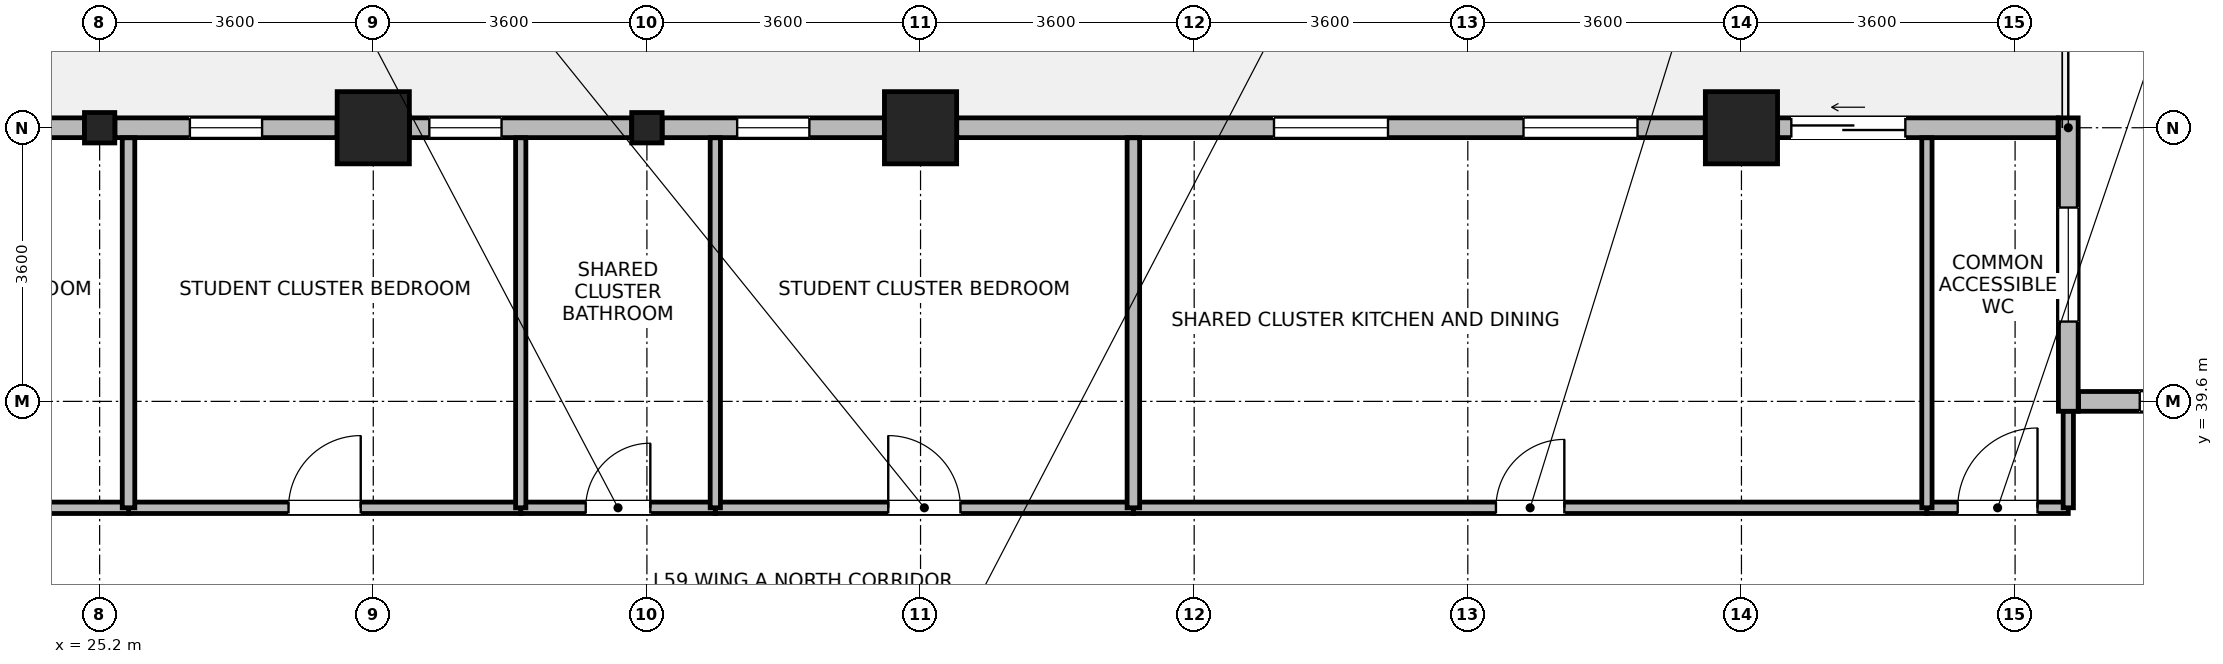
"""IFC4 building model, lengths in metres.
Left out: names, types, materials, properties, quantities, classifications, styles, units other than length and angle.
Written with IfcOpenShell. Run it as: python <this file> out.ifc"""

import sys

from ifc_helpers import new_model, si_unit, direction, frame, frame_2d, origin, origin_2d, place, context, subcontext, project, spatial, rectangle, i_section, extrude, source, transform, mapped, element, fill, save


model = new_model("IFC4")
c1 = context("Model", 3, precision=1e-05, world=origin(), true_north=direction((0.0, 1.0)))
c2 = subcontext(c1, "Body", "Model", "MODEL_VIEW")
j1 = project(units=[si_unit("LENGTHUNIT", "METRE"), si_unit("PLANEANGLEUNIT", "RADIAN")], contexts=[c1])
p1 = place(None, origin())
s1 = spatial("IfcSite", under=j1, at=p1, CompositionType="ELEMENT")
p2 = place(p1, origin())
s2 = spatial("IfcBuilding", under=s1, at=p2, CompositionType="ELEMENT")
p3 = place(p2, frame((0.0, 0.0, 231.4)))
s3 = spatial("IfcBuildingStorey", under=s2, at=p3, CompositionType="ELEMENT", Elevation=231.4)
m1 = source(origin(), c2, "Body", "SweptSolid", [
    extrude(rectangle(XDim=0.95, YDim=0.95, at=origin_2d()), origin(), (0.0, 0.0, 1.0), 3.7),
])
for number, where, z_axis, x_axis in (
    (1, (28.8, 43.2, 0.0), (0.0, 0.0, 1.0), (1.0, 0.0, 0.0)),
    (2, (36.0, 43.2, 0.0), (0.0, 0.0, 1.0), (1.0, 0.0, 0.0)),
    (3, (46.8, 43.2, 0.0), (0.0, 0.0, 1.0), (1.0, 0.0, 0.0)),
):
    element("IfcColumn", number, at=place(p3, frame(where, z_axis=z_axis, x_axis=x_axis)), inside=s3, PredefinedType="COLUMN", context=c2, shape_type="MappedRepresentation", body=[
        mapped(m1, transform((0.0, 0.0, 0.0), x_axis=(1.0, 0.0, 0.0), y_axis=(0.0, 1.0, 0.0), z_axis=(0.0, 0.0, 1.0), scale=1.0)),
    ])
m2 = source(origin(), c2, "Body", "SweptSolid", [
    extrude(i_section(OverallWidth=0.399, OverallDepth=0.4, WebThickness=0.017, FlangeThickness=0.023, FilletRadius=0.015, at=origin_2d()), origin(), (0.0, 0.0, 1.0), 3.7),
])
for number, where, z_axis, x_axis in (
    (4, (25.2, 43.2, 0.0), (0.0, 0.0, 1.0), (1.0, 0.0, 0.0)),
    (5, (32.4, 43.2, 0.0), (0.0, 0.0, 1.0), (1.0, 0.0, 0.0)),
):
    element("IfcColumn", number, at=place(p3, frame(where, z_axis=z_axis, x_axis=x_axis)), inside=s3, PredefinedType="COLUMN", context=c2, shape_type="MappedRepresentation", body=[
        mapped(m2, transform((0.0, 0.0, 0.0), x_axis=(1.0, 0.0, 0.0), y_axis=(0.0, 1.0, 0.0), z_axis=(0.0, 0.0, 1.0), scale=1.0)),
    ])
p4 = place(p3, frame((51.235, 39.6, 0.0), z_axis=(0.0, 0.0, 1.0), x_axis=(1.0, 0.0, 0.0)))
e6 = element("IfcWall", 6, at=p4, inside=s3, PredefinedType="STANDARD", context=c2, shape_type="SweptSolid", body=[
    extrude(rectangle(XDim=9.33, YDim=0.26, at=frame_2d((4.665, 0.0))), origin(), (0.0, 0.0, 1.0), 3.42),
])
p5 = place(p4, frame((0.805, 0.0, 0.85)))
e7 = element("IfcOpeningElement", 7, at=p5, cuts=e6, PredefinedType="OPENING", context=c2, shape_type="SweptSolid", body=[
    extrude(rectangle(XDim=1.5, YDim=1.85, at=frame_2d((0.75, 0.925))), frame((0.0, 0.14, 0.0), z_axis=(0.0, -1.0, 0.0), x_axis=(1.0, 0.0, 0.0)), (0.0, 0.0, 1.0), 0.28),
])
p6 = place(p4, frame((3.915, 0.0, 0.85)))
e8 = element("IfcOpeningElement", 8, at=p6, cuts=e6, PredefinedType="OPENING", context=c2, shape_type="SweptSolid", body=[
    extrude(rectangle(XDim=1.5, YDim=1.85, at=frame_2d((0.75, 0.925))), frame((0.0, 0.14, 0.0), z_axis=(0.0, -1.0, 0.0), x_axis=(1.0, 0.0, 0.0)), (0.0, 0.0, 1.0), 0.28),
])
p7 = place(p4, frame((7.025, 0.0, 0.85)))
e9 = element("IfcOpeningElement", 9, at=p7, cuts=e6, PredefinedType="OPENING", context=c2, shape_type="SweptSolid", body=[
    extrude(rectangle(XDim=1.5, YDim=1.85, at=frame_2d((0.75, 0.925))), frame((0.0, 0.14, 0.0), z_axis=(0.0, -1.0, 0.0), x_axis=(1.0, 0.0, 0.0)), (0.0, 0.0, 1.0), 0.28),
])
p8 = place(p3, frame((51.1, 43.33, 0.0), z_axis=(0.0, 0.0, 1.0), x_axis=(0.0, -1.0, 0.0)))
e10 = element("IfcWall", 10, at=p8, inside=s3, PredefinedType="STANDARD", context=c2, shape_type="SweptSolid", body=[
    extrude(rectangle(XDim=3.86, YDim=0.26, at=frame_2d((1.93, 0.0))), origin(), (0.0, 0.0, 1.0), 3.42),
])
p9 = place(p8, frame((1.18, 0.0, 0.85)))
e11 = element("IfcOpeningElement", 11, at=p9, cuts=e10, PredefinedType="OPENING", context=c2, shape_type="SweptSolid", body=[
    extrude(rectangle(XDim=1.5, YDim=1.85, at=frame_2d((0.75, 0.925))), frame((0.0, 0.14, 0.0), z_axis=(0.0, -1.0, 0.0), x_axis=(1.0, 0.0, 0.0)), (0.0, 0.0, 1.0), 0.28),
])
p10 = place(p3, frame((47.276, 43.2, 0.0), z_axis=(0.0, 0.0, 1.0), x_axis=(1.0, 0.0, 0.0)))
e12 = element("IfcWall", 12, at=p10, inside=s3, PredefinedType="STANDARD", context=c2, shape_type="SweptSolid", body=[
    extrude(rectangle(XDim=3.689, YDim=0.26, at=frame_2d((1.845, 0.0))), origin(), (0.0, 0.0, 1.0), 3.42),
])
p11 = place(p10, frame((0.18, 0.0, 0.0)))
e13 = element("IfcOpeningElement", 13, at=p11, cuts=e12, PredefinedType="OPENING", context=c2, shape_type="SweptSolid", body=[
    extrude(rectangle(XDim=1.5, YDim=2.15, at=frame_2d((0.75, 1.075))), frame((0.0, 0.14, 0.0), z_axis=(0.0, -1.0, 0.0), x_axis=(1.0, 0.0, 0.0)), (0.0, 0.0, 1.0), 0.28),
])
p12 = place(p3, frame((36.476, 43.2, 0.0), z_axis=(0.0, 0.0, 1.0), x_axis=(1.0, 0.0, 0.0)))
e14 = element("IfcWall", 14, at=p12, inside=s3, PredefinedType="STANDARD", context=c2, shape_type="SweptSolid", body=[
    extrude(rectangle(XDim=9.848, YDim=0.26, at=frame_2d((4.924, 0.0))), origin(), (0.0, 0.0, 1.0), 3.02),
])
p13 = place(p12, frame((4.174, 0.0, 0.85)))
e15 = element("IfcOpeningElement", 15, at=p13, cuts=e14, PredefinedType="OPENING", context=c2, shape_type="SweptSolid", body=[
    extrude(rectangle(XDim=1.5, YDim=1.85, at=frame_2d((0.75, 0.925))), frame((0.0, 0.14, 0.0), z_axis=(0.0, -1.0, 0.0), x_axis=(1.0, 0.0, 0.0)), (0.0, 0.0, 1.0), 0.28),
])
p14 = place(p12, frame((7.457, 0.0, 0.85)))
e16 = element("IfcOpeningElement", 16, at=p14, cuts=e14, PredefinedType="OPENING", context=c2, shape_type="SweptSolid", body=[
    extrude(rectangle(XDim=1.5, YDim=1.85, at=frame_2d((0.75, 0.925))), frame((0.0, 0.14, 0.0), z_axis=(0.0, -1.0, 0.0), x_axis=(1.0, 0.0, 0.0)), (0.0, 0.0, 1.0), 0.28),
])
p15 = place(p3, frame((32.601, 43.2, 0.0), z_axis=(0.0, 0.0, 1.0), x_axis=(1.0, 0.0, 0.0)))
e17 = element("IfcWall", 17, at=p15, inside=s3, PredefinedType="STANDARD", context=c2, shape_type="SweptSolid", body=[
    extrude(rectangle(XDim=2.923, YDim=0.26, at=frame_2d((1.462, 0.0))), origin(), (0.0, 0.0, 1.0), 3.02),
])
p16 = place(p15, frame((0.987, 0.0, 0.85)))
e18 = element("IfcOpeningElement", 18, at=p16, cuts=e17, PredefinedType="OPENING", context=c2, shape_type="SweptSolid", body=[
    extrude(rectangle(XDim=0.95, YDim=1.75, at=frame_2d((0.475, 0.875))), frame((0.0, 0.14, 0.0), z_axis=(0.0, -1.0, 0.0), x_axis=(1.0, 0.0, 0.0)), (0.0, 0.0, 1.0), 0.28),
])
p17 = place(p3, frame((29.276, 43.2, 0.0), z_axis=(0.0, 0.0, 1.0), x_axis=(1.0, 0.0, 0.0)))
e19 = element("IfcWall", 19, at=p17, inside=s3, PredefinedType="STANDARD", context=c2, shape_type="SweptSolid", body=[
    extrude(rectangle(XDim=2.924, YDim=0.26, at=frame_2d((1.462, 0.0))), origin(), (0.0, 0.0, 1.0), 3.02),
])
p18 = place(p17, frame((0.262, 0.0, 0.85)))
e20 = element("IfcOpeningElement", 20, at=p18, cuts=e19, PredefinedType="OPENING", context=c2, shape_type="SweptSolid", body=[
    extrude(rectangle(XDim=0.95, YDim=1.75, at=frame_2d((0.475, 0.875))), frame((0.0, 0.14, 0.0), z_axis=(0.0, -1.0, 0.0), x_axis=(1.0, 0.0, 0.0)), (0.0, 0.0, 1.0), 0.28),
])
p19 = place(p3, frame((25.4, 43.2, 0.0), z_axis=(0.0, 0.0, 1.0), x_axis=(1.0, 0.0, 0.0)))
e21 = element("IfcWall", 21, at=p19, inside=s3, PredefinedType="STANDARD", context=c2, shape_type="SweptSolid", body=[
    extrude(rectangle(XDim=2.924, YDim=0.26, at=frame_2d((1.462, 0.0))), origin(), (0.0, 0.0, 1.0), 3.02),
])
p20 = place(p19, frame((0.987, 0.0, 0.85)))
e22 = element("IfcOpeningElement", 22, at=p20, cuts=e21, PredefinedType="OPENING", context=c2, shape_type="SweptSolid", body=[
    extrude(rectangle(XDim=0.95, YDim=1.75, at=frame_2d((0.475, 0.875))), frame((0.0, 0.14, 0.0), z_axis=(0.0, -1.0, 0.0), x_axis=(1.0, 0.0, 0.0)), (0.0, 0.0, 1.0), 0.28),
])
p21 = place(p3, frame((22.076, 43.2, 0.0), z_axis=(0.0, 0.0, 1.0), x_axis=(1.0, 0.0, 0.0)))
e23 = element("IfcWall", 23, at=p21, inside=s3, PredefinedType="STANDARD", context=c2, shape_type="SweptSolid", body=[
    extrude(rectangle(XDim=2.924, YDim=0.26, at=frame_2d((1.462, 0.0))), origin(), (0.0, 0.0, 1.0), 3.02),
])
p22 = place(p21, frame((0.987, 0.0, 0.85)))
e24 = element("IfcOpeningElement", 24, at=p22, cuts=e23, PredefinedType="OPENING", context=c2, shape_type="SweptSolid", body=[
    extrude(rectangle(XDim=0.95, YDim=1.75, at=frame_2d((0.475, 0.875))), frame((0.0, 0.14, 0.0), z_axis=(0.0, -1.0, 0.0), x_axis=(1.0, 0.0, 0.0)), (0.0, 0.0, 1.0), 0.28),
])
p23 = place(p3, frame((38.8, 38.2, 0.0), z_axis=(0.0, 0.0, 1.0), x_axis=(1.0, 0.0, 0.0)))
e25 = element("IfcWall", 25, at=p23, inside=s3, PredefinedType="PARTITIONING", context=c2, shape_type="SweptSolid", body=[
    extrude(rectangle(XDim=10.44, YDim=0.15, at=frame_2d((5.22, 0.0))), origin(), (0.0, 0.0, 1.0), 3.42),
])
p24 = place(p23, frame((4.77, 0.0, 0.0)))
e26 = element("IfcOpeningElement", 26, at=p24, cuts=e25, PredefinedType="OPENING", context=c2, shape_type="SweptSolid", body=[
    extrude(rectangle(XDim=0.9, YDim=2.08, at=frame_2d((0.45, 1.04))), frame((0.0, 0.085, 0.0), z_axis=(0.0, -1.0, 0.0), x_axis=(1.0, 0.0, 0.0)), (0.0, 0.0, 1.0), 0.17),
])
p25 = place(p3, frame((33.3, 38.2, 0.0), z_axis=(0.0, 0.0, 1.0), x_axis=(1.0, 0.0, 0.0)))
e27 = element("IfcWall", 27, at=p25, inside=s3, PredefinedType="PARTITIONING", context=c2, shape_type="SweptSolid", body=[
    extrude(rectangle(XDim=5.5, YDim=0.15, at=frame_2d((2.75, 0.0))), origin(), (0.0, 0.0, 1.0), 3.42),
])
p26 = place(p25, frame((2.275, 0.0, 0.0)))
e28 = element("IfcOpeningElement", 28, at=p26, cuts=e27, PredefinedType="OPENING", context=c2, shape_type="SweptSolid", body=[
    extrude(rectangle(XDim=0.95, YDim=2.1, at=frame_2d((0.475, 1.05))), frame((0.0, 0.085, 0.0), z_axis=(0.0, -1.0, 0.0), x_axis=(1.0, 0.0, 0.0)), (0.0, 0.0, 1.0), 0.17),
])
p27 = place(p3, frame((25.58, 38.2, 0.0), z_axis=(0.0, 0.0, 1.0), x_axis=(1.0, 0.0, 0.0)))
e29 = element("IfcWall", 29, at=p27, inside=s3, PredefinedType="PARTITIONING", context=c2, shape_type="SweptSolid", body=[
    extrude(rectangle(XDim=5.16, YDim=0.15, at=frame_2d((2.58, 0.0))), origin(), (0.0, 0.0, 1.0), 3.42),
])
p28 = place(p27, frame((2.105, 0.0, 0.0)))
e30 = element("IfcOpeningElement", 30, at=p28, cuts=e29, PredefinedType="OPENING", context=c2, shape_type="SweptSolid", body=[
    extrude(rectangle(XDim=0.95, YDim=2.1, at=frame_2d((0.475, 1.05))), frame((0.0, 0.085, 0.0), z_axis=(0.0, -1.0, 0.0), x_axis=(1.0, 0.0, 0.0)), (0.0, 0.0, 1.0), 0.17),
])
p29 = place(p3, frame((20.76, 38.2, 0.0), z_axis=(0.0, 0.0, 1.0), x_axis=(1.0, 0.0, 0.0)))
e31 = element("IfcWall", 31, at=p29, inside=s3, PredefinedType="PARTITIONING", context=c2, shape_type="SweptSolid", body=[
    extrude(rectangle(XDim=4.82, YDim=0.15, at=frame_2d((2.41, 0.0))), origin(), (0.0, 0.0, 1.0), 3.42),
])
p30 = place(p29, frame((1.935, 0.0, 0.0)))
e32 = element("IfcOpeningElement", 32, at=p30, cuts=e31, PredefinedType="OPENING", context=c2, shape_type="SweptSolid", body=[
    extrude(rectangle(XDim=0.95, YDim=2.1, at=frame_2d((0.475, 1.05))), frame((0.0, 0.085, 0.0), z_axis=(0.0, -1.0, 0.0), x_axis=(1.0, 0.0, 0.0)), (0.0, 0.0, 1.0), 0.17),
])
p31 = place(p3, frame((30.74, 38.2, 0.0), z_axis=(0.0, 0.0, 1.0), x_axis=(1.0, 0.0, 0.0)))
e33 = element("IfcWall", 33, at=p31, inside=s3, PredefinedType="PARTITIONING", context=c2, shape_type="SweptSolid", body=[
    extrude(rectangle(XDim=2.56, YDim=0.15, at=frame_2d((1.28, 0.0))), origin(), (0.0, 0.0, 1.0), 3.42),
])
p32 = place(p31, frame((0.855, 0.0, 0.0)))
e34 = element("IfcOpeningElement", 34, at=p32, cuts=e33, PredefinedType="OPENING", context=c2, shape_type="SweptSolid", body=[
    extrude(rectangle(XDim=0.85, YDim=2.04, at=frame_2d((0.425, 1.02))), frame((0.0, 0.085, 0.0), z_axis=(0.0, -1.0, 0.0), x_axis=(1.0, 0.0, 0.0)), (0.0, 0.0, 1.0), 0.17),
])
p33 = place(p3, frame((49.24, 38.2, 0.0), z_axis=(0.0, 0.0, 1.0), x_axis=(1.0, 0.0, 0.0)))
e35 = element("IfcWall", 35, at=p33, inside=s3, PredefinedType="PARTITIONING", context=c2, shape_type="SweptSolid", body=[
    extrude(rectangle(XDim=1.86, YDim=0.15, at=frame_2d((0.93, 0.0))), origin(), (0.0, 0.0, 1.0), 3.42),
])
p34 = place(p33, frame((0.405, 0.0, 0.0)))
e36 = element("IfcOpeningElement", 36, at=p34, cuts=e35, PredefinedType="OPENING", context=c2, shape_type="SweptSolid", body=[
    extrude(rectangle(XDim=1.05, YDim=2.12, at=frame_2d((0.525, 1.06))), frame((0.0, 0.085, 0.0), z_axis=(0.0, -1.0, 0.0), x_axis=(1.0, 0.0, 0.0)), (0.0, 0.0, 1.0), 0.17),
])
p35 = place(p3, frame((25.58, 38.2, 0.0), z_axis=(0.0, 0.0, 1.0), x_axis=(0.0, 1.0, 0.0)))
e37 = element("IfcWall", 37, at=p35, inside=s3, PredefinedType="PARTITIONING", context=c2, shape_type="SweptSolid", body=[
    extrude(rectangle(XDim=4.868, YDim=0.165, at=frame_2d((2.434, 0.0))), origin(), (0.0, 0.0, 1.0), 3.42),
])
for number, where, z_axis, x_axis in (
    (38, (30.74, 38.2, 0.0), (0.0, 0.0, 1.0), (0.0, 1.0, 0.0)),
    (39, (33.3, 38.2, 0.0), (0.0, 0.0, 1.0), (0.0, 1.0, 0.0)),
):
    element("IfcWall", number, at=place(p3, frame(where, z_axis=z_axis, x_axis=x_axis)), inside=s3, PredefinedType="PARTITIONING", context=c2, shape_type="SweptSolid", body=[
        extrude(rectangle(XDim=4.868, YDim=0.135, at=frame_2d((2.434, 0.0))), origin(), (0.0, 0.0, 1.0), 3.42),
    ])
p36 = place(p3, frame((38.8, 38.2, 0.0), z_axis=(0.0, 0.0, 1.0), x_axis=(0.0, 1.0, 0.0)))
e40 = element("IfcWall", 40, at=p36, inside=s3, PredefinedType="PARTITIONING", context=c2, shape_type="SweptSolid", body=[
    extrude(rectangle(XDim=4.868, YDim=0.165, at=frame_2d((2.434, 0.0))), origin(), (0.0, 0.0, 1.0), 3.42),
])
p37 = place(p3, frame((49.24, 38.2, 0.0), z_axis=(0.0, 0.0, 1.0), x_axis=(0.0, 1.0, 0.0)))
e41 = element("IfcWall", 41, at=p37, inside=s3, PredefinedType="PARTITIONING", context=c2, shape_type="SweptSolid", body=[
    extrude(rectangle(XDim=4.868, YDim=0.135, at=frame_2d((2.434, 0.0))), origin(), (0.0, 0.0, 1.0), 3.42),
])
p38 = place(p3, frame((51.1, 38.2, 0.0), z_axis=(0.0, 0.0, 1.0), x_axis=(0.0, 1.0, 0.0)))
e42 = element("IfcWall", 42, at=p38, inside=s3, PredefinedType="PARTITIONING", context=c2, shape_type="SweptSolid", body=[
    extrude(rectangle(XDim=1.268, YDim=0.135, at=frame_2d((0.634, 0.0))), origin(), (0.0, 0.0, 1.0), 3.42),
])
p39 = place(p5, origin())
e43 = element("IfcWindow", 43, at=p39, inside=s3, PartitioningType="SINGLE_PANEL", PredefinedType="WINDOW", context=c2, shape_type="SweptSolid", body=[
    extrude(rectangle(XDim=1.5, YDim=1.85, at=frame_2d((0.75, 0.925))), frame((0.0, 0.03, 0.0), z_axis=(0.0, -1.0, 0.0), x_axis=(1.0, 0.0, 0.0)), (0.0, 0.0, 1.0), 0.06),
])
fill(e7, e43)
p40 = place(p9, origin())
e44 = element("IfcWindow", 44, at=p40, inside=s3, PartitioningType="SINGLE_PANEL", PredefinedType="WINDOW", context=c2, shape_type="SweptSolid", body=[
    extrude(rectangle(XDim=1.5, YDim=1.85, at=frame_2d((0.75, 0.925))), frame((0.0, 0.03, 0.0), z_axis=(0.0, -1.0, 0.0), x_axis=(1.0, 0.0, 0.0)), (0.0, 0.0, 1.0), 0.06),
])
fill(e11, e44)
p41 = place(p11, origin())
e45 = element("IfcDoor", 45, at=p41, inside=s3, OperationType="SLIDING_TO_LEFT", PredefinedType="DOOR", context=c2, shape_type="SweptSolid", body=[
    extrude(rectangle(XDim=1.5, YDim=2.15, at=frame_2d((0.75, 1.075))), frame((0.0, 0.025, 0.0), z_axis=(0.0, -1.0, 0.0), x_axis=(1.0, 0.0, 0.0)), (0.0, 0.0, 1.0), 0.05),
])
fill(e13, e45)
p42 = place(p13, origin())
e46 = element("IfcWindow", 46, at=p42, inside=s3, PartitioningType="SINGLE_PANEL", PredefinedType="WINDOW", context=c2, shape_type="SweptSolid", body=[
    extrude(rectangle(XDim=1.5, YDim=1.85, at=frame_2d((0.75, 0.925))), frame((0.0, 0.03, 0.0), z_axis=(0.0, -1.0, 0.0), x_axis=(1.0, 0.0, 0.0)), (0.0, 0.0, 1.0), 0.06),
])
fill(e15, e46)
p43 = place(p14, origin())
e47 = element("IfcWindow", 47, at=p43, inside=s3, PartitioningType="SINGLE_PANEL", PredefinedType="WINDOW", context=c2, shape_type="SweptSolid", body=[
    extrude(rectangle(XDim=1.5, YDim=1.85, at=frame_2d((0.75, 0.925))), frame((0.0, 0.03, 0.0), z_axis=(0.0, -1.0, 0.0), x_axis=(1.0, 0.0, 0.0)), (0.0, 0.0, 1.0), 0.06),
])
fill(e16, e47)
p44 = place(p16, origin())
e48 = element("IfcWindow", 48, at=p44, inside=s3, PartitioningType="SINGLE_PANEL", PredefinedType="WINDOW", context=c2, shape_type="SweptSolid", body=[
    extrude(rectangle(XDim=0.95, YDim=1.75, at=frame_2d((0.475, 0.875))), frame((0.0, 0.03, 0.0), z_axis=(0.0, -1.0, 0.0), x_axis=(1.0, 0.0, 0.0)), (0.0, 0.0, 1.0), 0.06),
])
fill(e18, e48)
p45 = place(p18, origin())
e49 = element("IfcWindow", 49, at=p45, inside=s3, PartitioningType="SINGLE_PANEL", PredefinedType="WINDOW", context=c2, shape_type="SweptSolid", body=[
    extrude(rectangle(XDim=0.95, YDim=1.75, at=frame_2d((0.475, 0.875))), frame((0.0, 0.03, 0.0), z_axis=(0.0, -1.0, 0.0), x_axis=(1.0, 0.0, 0.0)), (0.0, 0.0, 1.0), 0.06),
])
fill(e20, e49)
p46 = place(p20, origin())
e50 = element("IfcWindow", 50, at=p46, inside=s3, PartitioningType="SINGLE_PANEL", PredefinedType="WINDOW", context=c2, shape_type="SweptSolid", body=[
    extrude(rectangle(XDim=0.95, YDim=1.75, at=frame_2d((0.475, 0.875))), frame((0.0, 0.03, 0.0), z_axis=(0.0, -1.0, 0.0), x_axis=(1.0, 0.0, 0.0)), (0.0, 0.0, 1.0), 0.06),
])
fill(e22, e50)
p47 = place(p24, origin())
e51 = element("IfcDoor", 51, at=p47, inside=s3, OperationType="SINGLE_SWING_RIGHT", PredefinedType="DOOR", context=c2, shape_type="SweptSolid", body=[
    extrude(rectangle(XDim=0.9, YDim=2.08, at=frame_2d((0.45, 1.04))), frame((0.0, 0.025, 0.0), z_axis=(0.0, -1.0, 0.0), x_axis=(1.0, 0.0, 0.0)), (0.0, 0.0, 1.0), 0.05),
])
fill(e26, e51)
p48 = place(p26, origin())
e52 = element("IfcDoor", 52, at=p48, inside=s3, OperationType="SINGLE_SWING_LEFT", PredefinedType="DOOR", context=c2, shape_type="SweptSolid", body=[
    extrude(rectangle(XDim=0.95, YDim=2.1, at=frame_2d((0.475, 1.05))), frame((0.0, 0.025, 0.0), z_axis=(0.0, -1.0, 0.0), x_axis=(1.0, 0.0, 0.0)), (0.0, 0.0, 1.0), 0.05),
])
fill(e28, e52)
p49 = place(p28, origin())
e53 = element("IfcDoor", 53, at=p49, inside=s3, OperationType="SINGLE_SWING_RIGHT", PredefinedType="DOOR", context=c2, shape_type="SweptSolid", body=[
    extrude(rectangle(XDim=0.95, YDim=2.1, at=frame_2d((0.475, 1.05))), frame((0.0, 0.025, 0.0), z_axis=(0.0, -1.0, 0.0), x_axis=(1.0, 0.0, 0.0)), (0.0, 0.0, 1.0), 0.05),
])
fill(e30, e53)
p50 = place(p32, origin())
e54 = element("IfcDoor", 54, at=p50, inside=s3, OperationType="SINGLE_SWING_RIGHT", PredefinedType="DOOR", context=c2, shape_type="SweptSolid", body=[
    extrude(rectangle(XDim=0.85, YDim=2.04, at=frame_2d((0.425, 1.02))), frame((0.0, 0.025, 0.0), z_axis=(0.0, -1.0, 0.0), x_axis=(1.0, 0.0, 0.0)), (0.0, 0.0, 1.0), 0.05),
])
fill(e34, e54)
p51 = place(p34, origin())
e55 = element("IfcDoor", 55, at=p51, inside=s3, OperationType="SINGLE_SWING_RIGHT", PredefinedType="DOOR", context=c2, shape_type="SweptSolid", body=[
    extrude(rectangle(XDim=1.05, YDim=2.12, at=frame_2d((0.525, 1.06))), frame((0.0, 0.025, 0.0), z_axis=(0.0, -1.0, 0.0), x_axis=(1.0, 0.0, 0.0)), (0.0, 0.0, 1.0), 0.05),
])
fill(e36, e55)
save(model, sys.argv[1])
